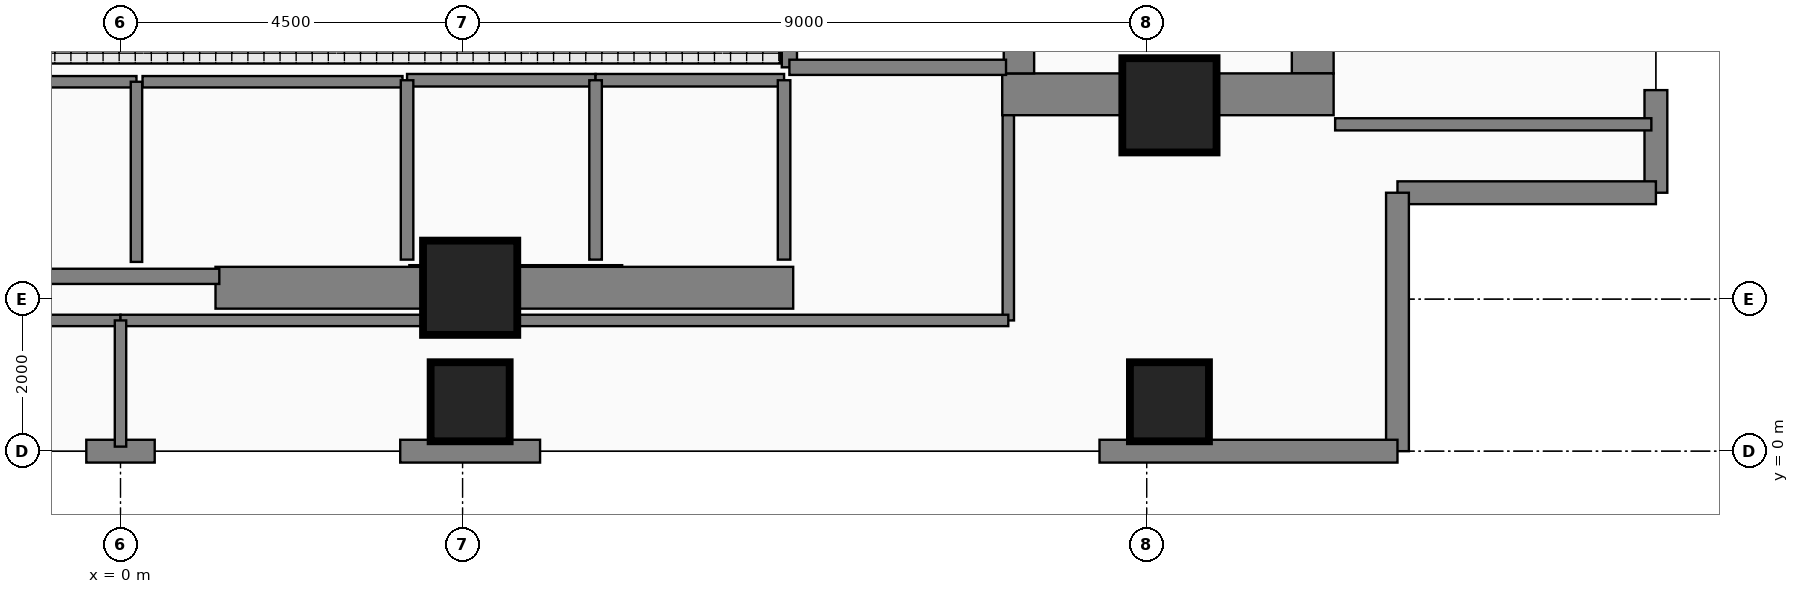
"""IFC4 building model, lengths in metres.
Left out: names, types, materials, properties, quantities, classifications, styles, units other than length and angle.
Written with IfcOpenShell. Run it as: python <this file> out.ifc"""

import sys

from ifc_helpers import new_model, si_unit, direction, frame, frame_2d, origin, origin_2d, place, context, subcontext, project, spatial, rectangle, extrude, element, fill, save


model = new_model("IFC4")
c1 = context("Model", 3, precision=1e-05, world=origin(), true_north=direction((0.0, 1.0)))
c2 = subcontext(c1, "Body", "Model", "MODEL_VIEW")
j1 = project(units=[si_unit("LENGTHUNIT", "METRE"), si_unit("PLANEANGLEUNIT", "RADIAN")], contexts=[c1])
p1 = place(None, origin())
s1 = spatial("IfcSite", under=j1, at=p1, CompositionType="ELEMENT")
p2 = place(p1, origin())
s2 = spatial("IfcBuilding", under=s1, at=p2, CompositionType="ELEMENT")
p3 = place(p2, frame((0.0, 0.0, 284.05)))
s3 = spatial("IfcBuildingStorey", under=s2, at=p3, CompositionType="ELEMENT", Elevation=284.05)
p4 = place(p3, frame((15.685, 4.97, 0.0), z_axis=(0.0, 0.0, 1.0), x_axis=(0.0, 1.0, 0.0)))
e1 = element("IfcWall", 1, at=p4, inside=s3, PredefinedType="SHEAR", context=c2, shape_type="SweptSolid", body=[
    extrude(rectangle(XDim=8.96, YDim=0.55, at=frame_2d((4.48, 0.0))), origin(), (0.0, 0.0, 1.0), 4.21),
])
p5 = place(p3, frame((11.6, 4.695, 0.0), z_axis=(0.0, 0.0, 1.0), x_axis=(1.0, 0.0, 0.0)))
e2 = element("IfcWall", 2, at=p5, inside=s3, PredefinedType="SHEAR", context=c2, shape_type="SweptSolid", body=[
    extrude(rectangle(XDim=4.36, YDim=0.55, at=frame_2d((2.18, 0.0))), origin(), (0.0, 0.0, 1.0), 4.21),
])
p6 = place(p3, frame((1.25, 2.15, 0.0), z_axis=(0.0, 0.0, 1.0), x_axis=(1.0, 0.0, 0.0)))
e3 = element("IfcWall", 3, at=p6, inside=s3, PredefinedType="SHEAR", context=c2, shape_type="SweptSolid", body=[
    extrude(rectangle(XDim=7.6, YDim=0.55, at=frame_2d((3.8, 0.0))), origin(), (0.0, 0.0, 1.0), 4.18),
])
p7 = place(p3, frame((11.82, 13.93, 0.0), z_axis=(0.0, 0.0, 1.0), x_axis=(0.0, -1.0, 0.0)))
e4 = element("IfcWall", 4, at=p7, inside=s3, PredefinedType="SHEAR", context=c2, shape_type="SweptSolid", body=[
    extrude(rectangle(XDim=8.96, YDim=0.4, at=frame_2d((4.48, 0.0))), origin(), (0.0, 0.0, 1.0), 4.21),
])
p8 = place(p7, frame((7.53, 0.0, 0.0)))
e5 = element("IfcOpeningElement", 5, at=p8, cuts=e4, PredefinedType="OPENING", context=c2, shape_type="SweptSolid", body=[
    extrude(rectangle(XDim=1.12, YDim=2.22, at=frame_2d((0.56, 1.11))), frame((0.0, 0.21, 0.0), z_axis=(0.0, -1.0, 0.0), x_axis=(1.0, 0.0, 0.0)), (0.0, 0.0, 1.0), 0.42),
])
for number, where, z_axis, x_axis in (
    (6, (4.6, 2.15, 0.0), (0.0, 0.0, 1.0), (1.0, 0.0, 0.0)),
    (7, (13.8, 4.55, 0.0), (0.0, 0.0, 1.0), (1.0, 0.0, 0.0)),
):
    element("IfcColumn", number, at=place(p3, frame(where, z_axis=z_axis, x_axis=x_axis)), inside=s3, PredefinedType="COLUMN", context=c2, shape_type="SweptSolid", body=[
        extrude(rectangle(XDim=1.2, YDim=1.2, at=origin_2d()), origin(), (0.0, 0.0, 1.0), 4.4),
    ])
for number, where, z_axis, x_axis in (
    (8, (4.6, 0.65, 0.0), (0.0, 0.0, 1.0), (1.0, 0.0, 0.0)),
    (9, (13.8, 0.65, 0.0), (0.0, 0.0, 1.0), (1.0, 0.0, 0.0)),
):
    element("IfcColumn", number, at=place(p3, frame(where, z_axis=z_axis, x_axis=x_axis)), inside=s3, PredefinedType="COLUMN", context=c2, shape_type="SweptSolid", body=[
        extrude(rectangle(XDim=1.0, YDim=1.0, at=origin_2d()), origin(), (0.0, 0.0, 1.0), 4.4),
    ])
p9 = place(p3, frame((20.2, 4.75, 0.0), z_axis=(0.0, 0.0, 1.0), x_axis=(0.0, -1.0, 0.0)))
e10 = element("IfcWall", 10, at=p9, inside=s3, PredefinedType="STANDARD", context=c2, shape_type="SweptSolid", body=[
    extrude(rectangle(XDim=1.35, YDim=0.3, at=frame_2d((0.675, 0.0))), origin(), (0.0, 0.0, 1.0), 4.18),
])
p10 = place(p3, frame((20.2, 3.4, 0.0), z_axis=(0.0, 0.0, 1.0), x_axis=(-1.0, 0.0, 0.0)))
e11 = element("IfcWall", 11, at=p10, inside=s3, PredefinedType="STANDARD", context=c2, shape_type="SweptSolid", body=[
    extrude(rectangle(XDim=3.4, YDim=0.3, at=frame_2d((1.7, 0.0))), origin(), (0.0, 0.0, 1.0), 4.18),
])
p11 = place(p10, frame((1.125, 0.0, 1.25)))
e12 = element("IfcOpeningElement", 12, at=p11, cuts=e11, PredefinedType="OPENING", context=c2, shape_type="SweptSolid", body=[
    extrude(rectangle(XDim=1.15, YDim=1.55, at=frame_2d((0.575, 0.775))), frame((0.0, 0.16, 0.0), z_axis=(0.0, -1.0, 0.0), x_axis=(1.0, 0.0, 0.0)), (0.0, 0.0, 1.0), 0.32),
])
p12 = place(p3, frame((16.8, 3.4, 0.0), z_axis=(0.0, 0.0, 1.0), x_axis=(0.0, -1.0, 0.0)))
e13 = element("IfcWall", 13, at=p12, inside=s3, PredefinedType="STANDARD", context=c2, shape_type="SweptSolid", body=[
    extrude(rectangle(XDim=3.4, YDim=0.3, at=frame_2d((1.7, 0.0))), origin(), (0.0, 0.0, 1.0), 4.18),
])
p13 = place(p12, frame((1.125, 0.0, 1.25)))
e14 = element("IfcOpeningElement", 14, at=p13, cuts=e13, PredefinedType="OPENING", context=c2, shape_type="SweptSolid", body=[
    extrude(rectangle(XDim=1.15, YDim=1.55, at=frame_2d((0.575, 0.775))), frame((0.0, 0.16, 0.0), z_axis=(0.0, -1.0, 0.0), x_axis=(1.0, 0.0, 0.0)), (0.0, 0.0, 1.0), 0.32),
])
p14 = place(p3, frame((16.8, 0.0, 0.0), z_axis=(0.0, 0.0, 1.0), x_axis=(-1.0, 0.0, 0.0)))
e15 = element("IfcWall", 15, at=p14, inside=s3, PredefinedType="STANDARD", context=c2, shape_type="SweptSolid", body=[
    extrude(rectangle(XDim=3.92, YDim=0.3, at=frame_2d((1.96, 0.0))), origin(), (0.0, 0.0, 1.0), 4.18),
])
p15 = place(p14, frame((0.695, 0.0, 0.95)))
e16 = element("IfcOpeningElement", 16, at=p15, cuts=e15, PredefinedType="OPENING", context=c2, shape_type="SweptSolid", body=[
    extrude(rectangle(XDim=1.15, YDim=1.55, at=frame_2d((0.575, 0.775))), frame((0.0, 0.16, 0.0), z_axis=(0.0, -1.0, 0.0), x_axis=(1.0, 0.0, 0.0)), (0.0, 0.0, 1.0), 0.32),
])
p16 = place(p3, frame((5.52, 0.0, 0.0), z_axis=(0.0, 0.0, 1.0), x_axis=(-1.0, 0.0, 0.0)))
e17 = element("IfcWall", 17, at=p16, inside=s3, PredefinedType="STANDARD", context=c2, shape_type="SweptSolid", body=[
    extrude(rectangle(XDim=1.84, YDim=0.3, at=frame_2d((0.92, 0.0))), origin(), (0.0, 0.0, 1.0), 4.18),
])
p17 = place(p3, frame((0.45, 0.0, 0.0), z_axis=(0.0, 0.0, 1.0), x_axis=(-1.0, 0.0, 0.0)))
e18 = element("IfcWall", 18, at=p17, inside=s3, PredefinedType="STANDARD", context=c2, shape_type="SweptSolid", body=[
    extrude(rectangle(XDim=0.9, YDim=0.3, at=frame_2d((0.45, 0.0))), origin(), (0.0, 0.0, 1.0), 4.18),
])
p18 = place(p3, frame((8.8, 11.15, 0.0), z_axis=(0.0, 0.0, 1.0), x_axis=(0.0, -1.0, 0.0)))
e19 = element("IfcWall", 19, at=p18, inside=s3, PredefinedType="PARTITIONING", context=c2, shape_type="SweptSolid", body=[
    extrude(rectangle(XDim=6.1, YDim=0.2, at=frame_2d((3.05, 0.0))), origin(), (0.0, 0.0, 1.0), 4.18),
])
p19 = place(p18, frame((1.15, 0.0, 0.0)))
e20 = element("IfcOpeningElement", 20, at=p19, cuts=e19, PredefinedType="OPENING", context=c2, shape_type="SweptSolid", body=[
    extrude(rectangle(XDim=1.1, YDim=2.2, at=frame_2d((0.55, 1.1))), frame((0.0, 0.11, 0.0), z_axis=(0.0, -1.0, 0.0), x_axis=(1.0, 0.0, 0.0)), (0.0, 0.0, 1.0), 0.22),
])
p20 = place(p18, frame((4.75, 0.0, 0.0)))
e21 = element("IfcOpeningElement", 21, at=p20, cuts=e19, PredefinedType="OPENING", context=c2, shape_type="SweptSolid", body=[
    extrude(rectangle(XDim=1.1, YDim=2.2, at=frame_2d((0.55, 1.1))), frame((0.0, 0.11, 0.0), z_axis=(0.0, -1.0, 0.0), x_axis=(1.0, 0.0, 0.0)), (0.0, 0.0, 1.0), 0.22),
])
p21 = place(p3, frame((3.77, 4.88, 0.0), z_axis=(0.0, 0.0, 1.0), x_axis=(1.0, 0.0, 0.0)))
e22 = element("IfcWall", 22, at=p21, inside=s3, PredefinedType="PARTITIONING", context=c2, shape_type="SweptSolid", body=[
    extrude(rectangle(XDim=2.48, YDim=0.165, at=frame_2d((1.24, 0.0))), origin(), (0.0, 0.0, 1.0), 4.18),
])
p22 = place(p21, frame((0.69, 0.0, 0.0)))
e23 = element("IfcOpeningElement", 23, at=p22, cuts=e22, PredefinedType="OPENING", context=c2, shape_type="SweptSolid", body=[
    extrude(rectangle(XDim=1.1, YDim=2.25, at=frame_2d((0.55, 1.125))), frame((0.0, 0.093, 0.0), z_axis=(0.0, -1.0, 0.0), x_axis=(1.0, 0.0, 0.0)), (0.0, 0.0, 1.0), 0.185),
])
p23 = place(p3, frame((6.25, 4.88, 0.0), z_axis=(0.0, 0.0, 1.0), x_axis=(1.0, 0.0, 0.0)))
e24 = element("IfcWall", 24, at=p23, inside=s3, PredefinedType="PARTITIONING", context=c2, shape_type="SweptSolid", body=[
    extrude(rectangle(XDim=2.48, YDim=0.165, at=frame_2d((1.24, 0.0))), origin(), (0.0, 0.0, 1.0), 4.18),
])
p24 = place(p23, frame((0.69, 0.0, 0.0)))
e25 = element("IfcOpeningElement", 25, at=p24, cuts=e24, PredefinedType="OPENING", context=c2, shape_type="SweptSolid", body=[
    extrude(rectangle(XDim=1.1, YDim=2.25, at=frame_2d((0.55, 1.125))), frame((0.0, 0.093, 0.0), z_axis=(0.0, -1.0, 0.0), x_axis=(1.0, 0.0, 0.0)), (0.0, 0.0, 1.0), 0.185),
])
p25 = place(p3, frame((-4.41, 4.86, 0.0), z_axis=(0.0, 0.0, 1.0), x_axis=(1.0, 0.0, 0.0)))
e26 = element("IfcWall", 26, at=p25, inside=s3, PredefinedType="PARTITIONING", context=c2, shape_type="SweptSolid", body=[
    extrude(rectangle(XDim=4.62, YDim=0.15, at=frame_2d((2.31, 0.0))), origin(), (0.0, 0.0, 1.0), 4.18),
])
p26 = place(p25, frame((1.86, 0.0, 0.0)))
e27 = element("IfcOpeningElement", 27, at=p26, cuts=e26, PredefinedType="OPENING", context=c2, shape_type="SweptSolid", body=[
    extrude(rectangle(XDim=0.9, YDim=2.15, at=frame_2d((0.45, 1.075))), frame((0.0, 0.085, 0.0), z_axis=(0.0, -1.0, 0.0), x_axis=(1.0, 0.0, 0.0)), (0.0, 0.0, 1.0), 0.17),
])
p27 = place(p3, frame((0.29, 4.86, 0.0), z_axis=(0.0, 0.0, 1.0), x_axis=(1.0, 0.0, 0.0)))
e28 = element("IfcWall", 28, at=p27, inside=s3, PredefinedType="PARTITIONING", context=c2, shape_type="SweptSolid", body=[
    extrude(rectangle(XDim=3.42, YDim=0.15, at=frame_2d((1.71, 0.0))), origin(), (0.0, 0.0, 1.0), 4.18),
])
p28 = place(p27, frame((1.26, 0.0, 0.0)))
e29 = element("IfcOpeningElement", 29, at=p28, cuts=e28, PredefinedType="OPENING", context=c2, shape_type="SweptSolid", body=[
    extrude(rectangle(XDim=0.9, YDim=2.15, at=frame_2d((0.45, 1.075))), frame((0.0, 0.085, 0.0), z_axis=(0.0, -1.0, 0.0), x_axis=(1.0, 0.0, 0.0)), (0.0, 0.0, 1.0), 0.17),
])
p29 = place(p3, frame((15.98, 4.3, 0.0), z_axis=(0.0, 0.0, 1.0), x_axis=(1.0, 0.0, 0.0)))
e30 = element("IfcWall", 30, at=p29, inside=s3, PredefinedType="PARTITIONING", context=c2, shape_type="SweptSolid", body=[
    extrude(rectangle(XDim=4.16, YDim=0.16, at=frame_2d((2.08, 0.0))), origin(), (0.0, 0.0, 1.0), 4.18),
])
p30 = place(p29, frame((1.605, 0.0, 0.0)))
e31 = element("IfcOpeningElement", 31, at=p30, cuts=e30, PredefinedType="OPENING", context=c2, shape_type="SweptSolid", body=[
    extrude(rectangle(XDim=0.95, YDim=2.15, at=frame_2d((0.475, 1.075))), frame((0.0, 0.09, 0.0), z_axis=(0.0, -1.0, 0.0), x_axis=(1.0, 0.0, 0.0)), (0.0, 0.0, 1.0), 0.18),
])
p31 = place(p3, frame((8.8, 5.05, 0.0), z_axis=(0.0, 0.0, 1.0), x_axis=(1.0, 0.0, 0.0)))
e32 = element("IfcWall", 32, at=p31, inside=s3, PredefinedType="PARTITIONING", context=c2, shape_type="SweptSolid", body=[
    extrude(rectangle(XDim=2.85, YDim=0.2, at=frame_2d((1.425, 0.0))), origin(), (0.0, 0.0, 1.0), 4.18),
])
for number, where, z_axis, x_axis in (
    (33, (3.77, 2.52, 0.0), (0.0, 0.0, 1.0), (0.0, 1.0, 0.0)),
    (34, (6.25, 2.52, 0.0), (0.0, 0.0, 1.0), (0.0, 1.0, 0.0)),
    (35, (8.73, 2.52, 0.0), (0.0, 0.0, 1.0), (0.0, 1.0, 0.0)),
):
    element("IfcWall", number, at=place(p3, frame(where, z_axis=z_axis, x_axis=x_axis)), inside=s3, PredefinedType="PARTITIONING", context=c2, shape_type="SweptSolid", body=[
        extrude(rectangle(XDim=2.36, YDim=0.165, at=frame_2d((1.18, 0.0))), origin(), (0.0, 0.0, 1.0), 4.18),
    ])
p32 = place(p3, frame((-1.3, 2.3, 0.0), z_axis=(0.0, 0.0, 1.0), x_axis=(1.0, 0.0, 0.0)))
e36 = element("IfcWall", 36, at=p32, inside=s3, PredefinedType="PARTITIONING", context=c2, shape_type="SweptSolid", body=[
    extrude(rectangle(XDim=2.6, YDim=0.2, at=frame_2d((1.3, 0.0))), origin(), (0.0, 0.0, 1.0), 3.08),
])
p33 = place(p3, frame((0.21, 2.49, 0.0), z_axis=(0.0, 0.0, 1.0), x_axis=(0.0, 1.0, 0.0)))
e37 = element("IfcWall", 37, at=p33, inside=s3, PredefinedType="PARTITIONING", context=c2, shape_type="SweptSolid", body=[
    extrude(rectangle(XDim=2.37, YDim=0.15, at=frame_2d((1.185, 0.0))), origin(), (0.0, 0.0, 1.0), 4.18),
])
p34 = place(p3, frame((-11.68, 1.72, 0.0), z_axis=(0.0, 0.0, 1.0), x_axis=(1.0, 0.0, 0.0)))
e38 = element("IfcWall", 38, at=p34, inside=s3, PredefinedType="PARTITIONING", context=c2, shape_type="SweptSolid", body=[
    extrude(rectangle(XDim=11.68, YDim=0.15, at=frame_2d((5.84, 0.0))), origin(), (0.0, 0.0, 1.0), 3.08),
])
p35 = place(p3, frame((11.68, 1.72, 0.0), z_axis=(0.0, 0.0, 1.0), x_axis=(0.0, 1.0, 0.0)))
e39 = element("IfcWall", 39, at=p35, inside=s3, PredefinedType="PARTITIONING", context=c2, shape_type="SweptSolid", body=[
    extrude(rectangle(XDim=2.7, YDim=0.15, at=frame_2d((1.35, 0.0))), origin(), (0.0, 0.0, 1.0), 4.18),
])
p36 = place(p3, frame((0.0, 1.72, 0.0), z_axis=(0.0, 0.0, 1.0), x_axis=(1.0, 0.0, 0.0)))
e40 = element("IfcWall", 40, at=p36, inside=s3, PredefinedType="PARTITIONING", context=c2, shape_type="SweptSolid", body=[
    extrude(rectangle(XDim=11.68, YDim=0.15, at=frame_2d((5.84, 0.0))), origin(), (0.0, 0.0, 1.0), 3.08),
])
p37 = place(p3, frame((0.0, 0.06, 0.0), z_axis=(0.0, 0.0, 1.0), x_axis=(0.0, 1.0, 0.0)))
e41 = element("IfcWall", 41, at=p37, inside=s3, PredefinedType="PARTITIONING", context=c2, shape_type="SweptSolid", body=[
    extrude(rectangle(XDim=1.66, YDim=0.15, at=frame_2d((0.83, 0.0))), origin(), (0.0, 0.0, 1.0), 4.18),
])
p38 = place(p11, origin())
e42 = element("IfcWindow", 42, at=p38, inside=s3, PartitioningType="SINGLE_PANEL", PredefinedType="WINDOW", context=c2, shape_type="SweptSolid", body=[
    extrude(rectangle(XDim=1.15, YDim=1.55, at=frame_2d((0.575, 0.775))), frame((0.0, 0.03, 0.0), z_axis=(0.0, -1.0, 0.0), x_axis=(1.0, 0.0, 0.0)), (0.0, 0.0, 1.0), 0.06),
])
fill(e12, e42)
p39 = place(p13, origin())
e43 = element("IfcWindow", 43, at=p39, inside=s3, PartitioningType="SINGLE_PANEL", PredefinedType="WINDOW", context=c2, shape_type="SweptSolid", body=[
    extrude(rectangle(XDim=1.15, YDim=1.55, at=frame_2d((0.575, 0.775))), frame((0.0, 0.03, 0.0), z_axis=(0.0, -1.0, 0.0), x_axis=(1.0, 0.0, 0.0)), (0.0, 0.0, 1.0), 0.06),
])
fill(e14, e43)
p40 = place(p15, origin())
e44 = element("IfcWindow", 44, at=p40, inside=s3, PartitioningType="SINGLE_PANEL", PredefinedType="WINDOW", context=c2, shape_type="SweptSolid", body=[
    extrude(rectangle(XDim=1.15, YDim=1.55, at=frame_2d((0.575, 0.775))), frame((0.0, 0.03, 0.0), z_axis=(0.0, -1.0, 0.0), x_axis=(1.0, 0.0, 0.0)), (0.0, 0.0, 1.0), 0.06),
])
fill(e16, e44)
p41 = place(p22, origin())
e45 = element("IfcDoor", 45, at=p41, inside=s3, OperationType="SLIDING_TO_LEFT", PredefinedType="DOOR", context=c2, shape_type="SweptSolid", body=[
    extrude(rectangle(XDim=1.1, YDim=2.25, at=frame_2d((0.55, 1.125))), frame((0.0, 0.025, 0.0), z_axis=(0.0, -1.0, 0.0), x_axis=(1.0, 0.0, 0.0)), (0.0, 0.0, 1.0), 0.05),
])
fill(e23, e45)
p42 = place(p24, origin())
e46 = element("IfcDoor", 46, at=p42, inside=s3, OperationType="SLIDING_TO_LEFT", PredefinedType="DOOR", context=c2, shape_type="SweptSolid", body=[
    extrude(rectangle(XDim=1.1, YDim=2.25, at=frame_2d((0.55, 1.125))), frame((0.0, 0.025, 0.0), z_axis=(0.0, -1.0, 0.0), x_axis=(1.0, 0.0, 0.0)), (0.0, 0.0, 1.0), 0.05),
])
fill(e25, e46)
p43 = place(p28, origin())
e47 = element("IfcDoor", 47, at=p43, inside=s3, OperationType="SINGLE_SWING_LEFT", PredefinedType="DOOR", context=c2, shape_type="SweptSolid", body=[
    extrude(rectangle(XDim=0.9, YDim=2.15, at=frame_2d((0.45, 1.075))), frame((0.0, 0.025, 0.0), z_axis=(0.0, -1.0, 0.0), x_axis=(1.0, 0.0, 0.0)), (0.0, 0.0, 1.0), 0.05),
])
fill(e29, e47)
p44 = place(p30, origin())
e48 = element("IfcDoor", 48, at=p44, inside=s3, OperationType="SINGLE_SWING_LEFT", PredefinedType="DOOR", context=c2, shape_type="SweptSolid", body=[
    extrude(rectangle(XDim=0.95, YDim=2.15, at=frame_2d((0.475, 1.075))), frame((0.0, 0.025, 0.0), z_axis=(0.0, -1.0, 0.0), x_axis=(1.0, 0.0, 0.0)), (0.0, 0.0, 1.0), 0.05),
])
fill(e31, e48)
save(model, sys.argv[1])
